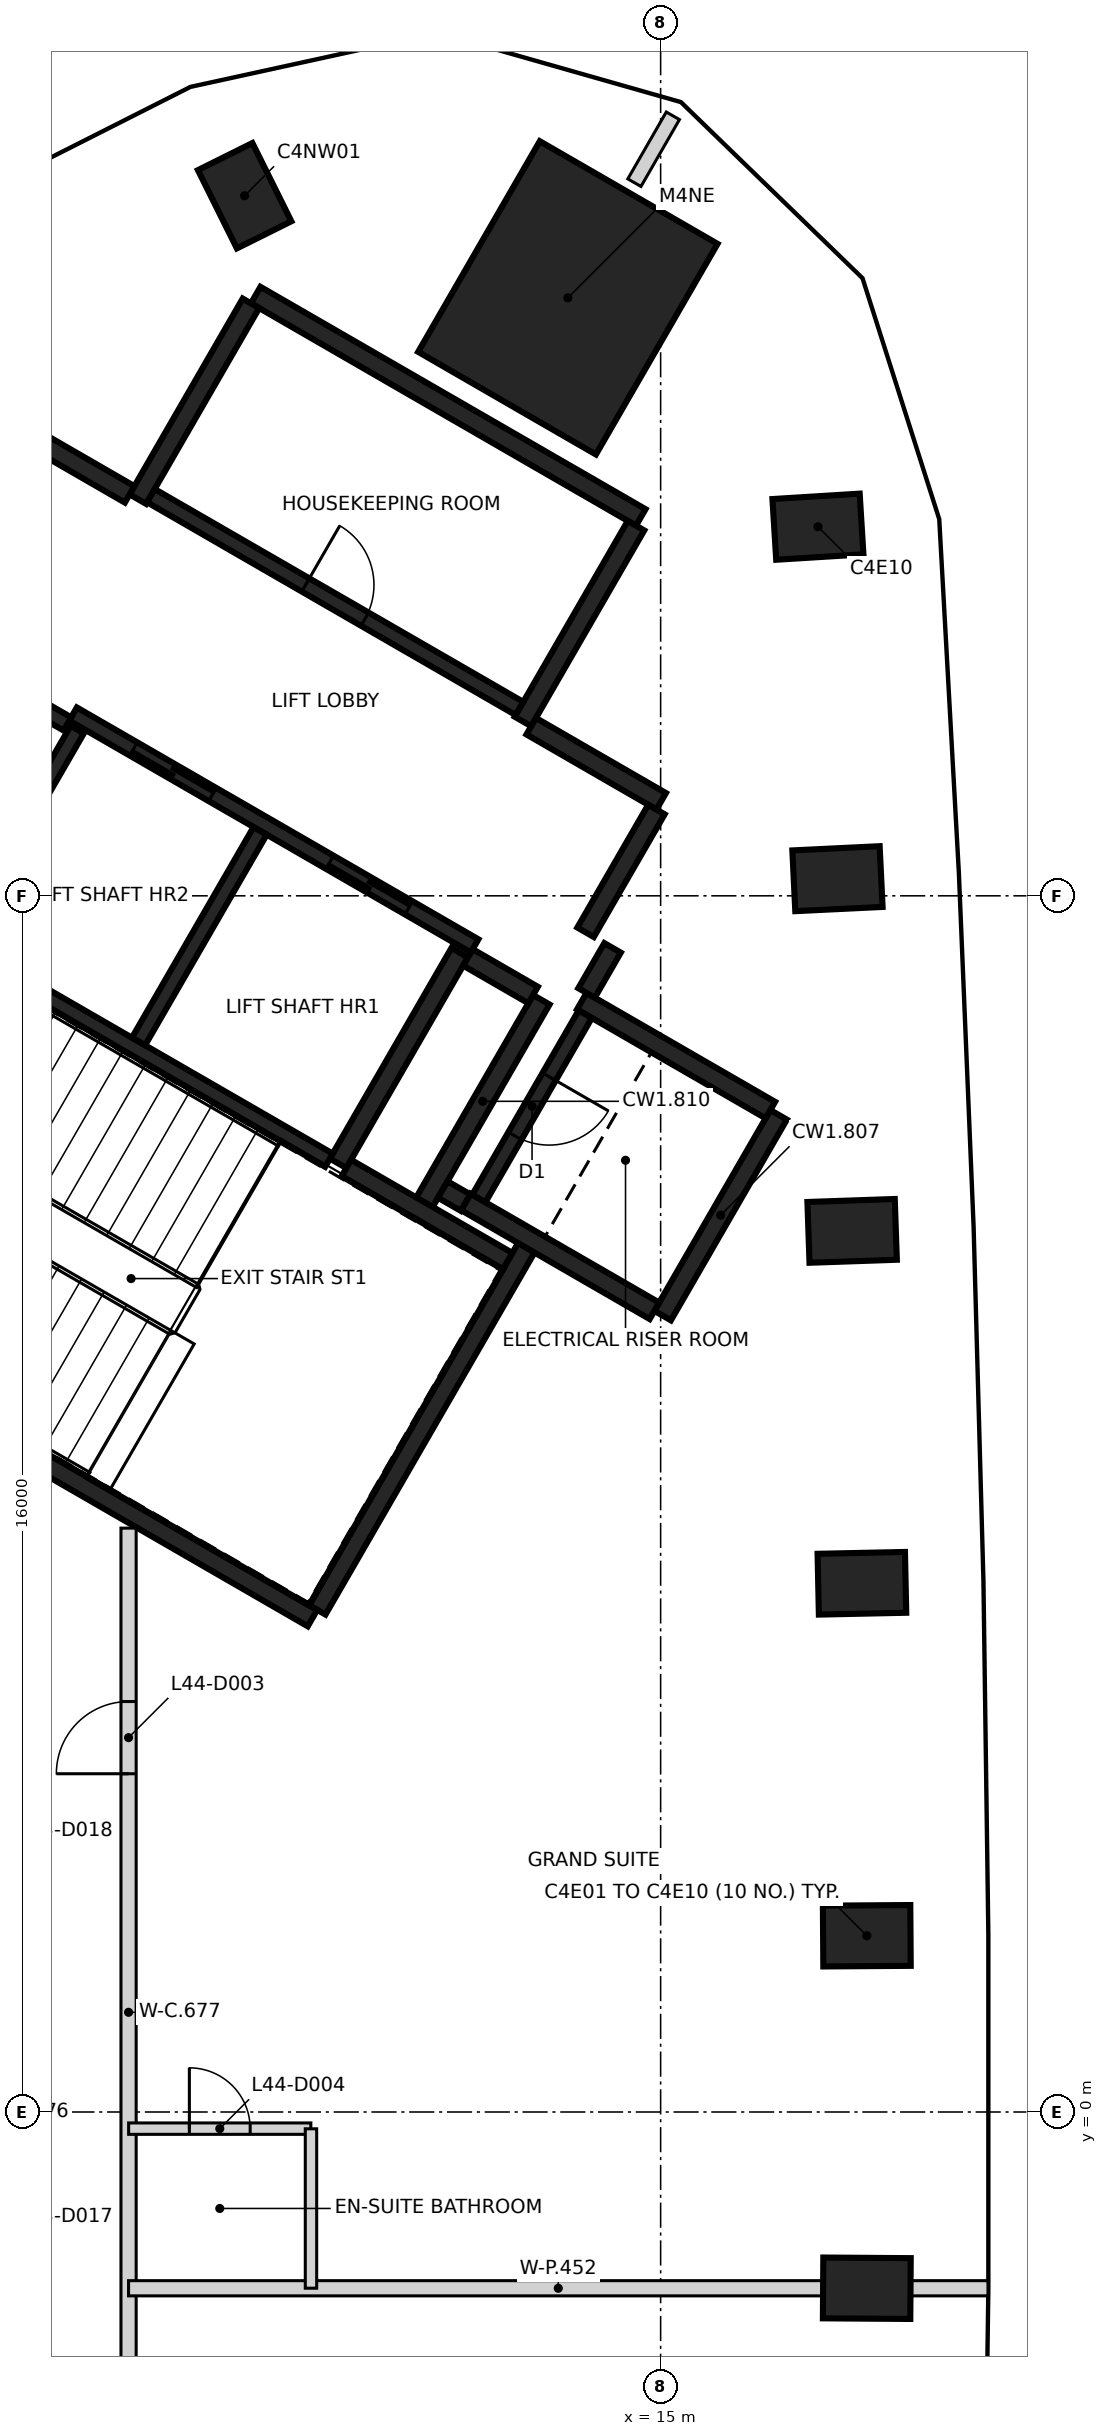
"""IFC4 building model, lengths in metres.
Left out: names, types, materials, properties, quantities, classifications, styles, units other than length and angle.
Written with IfcOpenShell. Run it as: python <this file> out.ifc"""

import sys

from ifc_helpers import new_model, si_unit, direction, frame, frame_2d, origin, origin_2d, place, context, subcontext, project, spatial, rectangle, extrude, element, fill, save


model = new_model("IFC4")
c1 = context("Model", 3, precision=1e-05, world=origin(), true_north=direction((0.0, 1.0)))
c2 = subcontext(c1, "Body", "Model", "MODEL_VIEW")
j1 = project(units=[si_unit("LENGTHUNIT", "METRE"), si_unit("PLANEANGLEUNIT", "RADIAN")], contexts=[c1])
p1 = place(None, origin())
s1 = spatial("IfcSite", under=j1, at=p1, CompositionType="ELEMENT")
p2 = place(p1, origin())
s2 = spatial("IfcBuilding", under=s1, at=p2, CompositionType="ELEMENT")
p3 = place(p2, frame((0.0, 0.0, 179.2)))
s3 = spatial("IfcBuildingStorey", under=s2, at=p3, CompositionType="ELEMENT", Elevation=179.2)
for number, where, z_axis, x_axis in (
    (1, (17.712, -2.319, -0.35), (0.0, 0.0, 1.0), (-1.0, 0.007, 0.0)),
    (2, (17.712, 2.319, -0.35), (0.0, 0.0, 1.0), (1.0, 0.007, 0.0)),
    (3, (17.648, 6.956, -0.35), (0.0, 0.0, 1.0), (1.0, 0.021, 0.0)),
    (4, (17.519, 11.592, -0.35), (0.0, 0.0, 1.0), (0.999, 0.034, 0.0)),
    (5, (17.326, 16.226, -0.35), (0.0, 0.0, 1.0), (0.999, 0.048, 0.0)),
    (6, (17.07, 20.856, -0.35), (0.0, 0.0, 1.0), (0.998, 0.062, 0.0)),
    (7, (9.527, 25.211, -0.35), (0.0, 0.0, 1.0), (-0.445, 0.895, 0.0)),
):
    element("IfcColumn", number, at=place(p3, frame(where, z_axis=z_axis, x_axis=x_axis)), inside=s3, PredefinedType="COLUMN", context=c2, shape_type="SweptSolid", body=[
        extrude(rectangle(XDim=1.15, YDim=0.8, at=origin_2d()), origin(), (0.0, 0.0, 1.0), 3.6),
    ])
p4 = place(p3, frame((13.78, 23.867, -0.35), z_axis=(0.0, 0.0, 1.0), x_axis=(0.5, 0.866025403784, 0.0)))
e8 = element("IfcColumn", 8, at=p4, inside=s3, PredefinedType="COLUMN", context=c2, shape_type="SweptSolid", body=[
    extrude(rectangle(XDim=3.2, YDim=2.7, at=origin_2d()), origin(), (0.0, 0.0, 1.0), 3.6),
])
p5 = place(p3, frame((10.42, 6.498, 0.0), z_axis=(0.0, 0.0, 1.0), x_axis=(-0.866021906294, 0.500006057782, 0.0)))
e9 = element("IfcWall", 9, at=p5, inside=s3, PredefinedType="SHEAR", context=c2, shape_type="SweptSolid", body=[
    extrude(rectangle(XDim=11.55, YDim=0.25, at=frame_2d((5.775, 0.0))), origin(), (0.0, 0.0, 1.0), 3.25),
])
p6 = place(p5, frame((10.025, 0.0, 0.0)))
e10 = element("IfcOpeningElement", 10, at=p6, cuts=e9, PredefinedType="OPENING", context=c2, shape_type="SweptSolid", body=[
    extrude(rectangle(XDim=1.2, YDim=2.1, at=frame_2d((0.6, 1.05))), frame((0.0, 0.135, 0.0), z_axis=(0.0, -1.0, 0.0), x_axis=(1.0, 0.0, 0.0)), (0.0, 0.0, 1.0), 0.27),
])
p7 = place(p5, frame((8.725, 0.0, 0.0)))
e11 = element("IfcOpeningElement", 11, at=p7, cuts=e9, PredefinedType="OPENING", context=c2, shape_type="SweptSolid", body=[
    extrude(rectangle(XDim=1.2, YDim=2.1, at=frame_2d((0.6, 1.05))), frame((0.0, 0.135, 0.0), z_axis=(0.0, -1.0, 0.0), x_axis=(1.0, 0.0, 0.0)), (0.0, 0.0, 1.0), 0.27),
])
p8 = place(p3, frame((9.673, 23.903, 0.0), z_axis=(0.0, 0.0, 1.0), x_axis=(0.86603616409, -0.499981362141, 0.0)))
e12 = element("IfcWall", 12, at=p8, inside=s3, PredefinedType="SHEAR", context=c2, shape_type="SweptSolid", body=[
    extrude(rectangle(XDim=5.85, YDim=0.25, at=frame_2d((2.925, 0.0))), origin(), (0.0, 0.0, 1.0), 3.25),
])
p9 = place(p3, frame((13.238, 11.378, 0.0), z_axis=(0.0, 0.0, 1.0), x_axis=(-0.500008851346, -0.866020293397, 0.0)))
e13 = element("IfcWall", 13, at=p9, inside=s3, PredefinedType="SHEAR", context=c2, shape_type="SweptSolid", body=[
    extrude(rectangle(XDim=5.51, YDim=0.25, at=frame_2d((2.755, 0.0))), origin(), (0.0, 0.0, 1.0), 3.25),
])
p10 = place(p3, frame((12.357, 15.252, 0.0), z_axis=(0.0, 0.0, 1.0), x_axis=(-0.500028443584, -0.866008981251, 0.0)))
e14 = element("IfcWall", 14, at=p10, inside=s3, PredefinedType="SHEAR", context=c2, shape_type="SweptSolid", body=[
    extrude(rectangle(XDim=3.2, YDim=0.25, at=frame_2d((1.6, 0.0))), origin(), (0.0, 0.0, 1.0), 3.25),
])
for number, where, z_axis, x_axis in (
    (15, (8.123, 21.219, 0.0), (0.0, 0.0, 1.0), (0.5, 0.866, 0.0)),
    (16, (14.676, 20.87, 0.0), (0.0, 0.0, 1.0), (-0.5, -0.866, 0.0)),
):
    element("IfcWall", number, at=place(p3, frame(where, z_axis=z_axis, x_axis=x_axis)), inside=s3, PredefinedType="SHEAR", context=c2, shape_type="SweptSolid", body=[
        extrude(rectangle(XDim=2.975, YDim=0.25, at=frame_2d((1.487, 0.0))), origin(), (0.0, 0.0, 1.0), 3.25),
    ])
p11 = place(p3, frame((16.552, 13.119, 0.0), z_axis=(0.0, 0.0, 1.0), x_axis=(-0.499978833458, -0.866037623948, 0.0)))
e17 = element("IfcWall", 17, at=p11, inside=s3, PredefinedType="SHEAR", context=c2, shape_type="SweptSolid", body=[
    extrude(rectangle(XDim=3.05, YDim=0.25, at=frame_2d((1.525, 0.0))), origin(), (0.0, 0.0, 1.0), 3.25),
])
p12 = place(p3, frame((14.918, 10.54, 0.0), z_axis=(0.0, 0.0, 1.0), x_axis=(-0.866063538972, 0.499933942099, 0.0)))
e18 = element("IfcWall", 18, at=p12, inside=s3, PredefinedType="SHEAR", context=c2, shape_type="SweptSolid", body=[
    extrude(rectangle(XDim=2.865, YDim=0.25, at=frame_2d((1.432, 0.0))), origin(), (0.0, 0.0, 1.0), 3.25),
])
p13 = place(p3, frame((13.963, 14.614, 0.0), z_axis=(0.0, 0.0, 1.0), x_axis=(0.866042235819, -0.499970844928, 0.0)))
e19 = element("IfcWall", 19, at=p13, inside=s3, PredefinedType="SHEAR", context=c2, shape_type="SweptSolid", body=[
    extrude(rectangle(XDim=2.865, YDim=0.25, at=frame_2d((1.432, 0.0))), origin(), (0.0, 0.0, 1.0), 3.25),
])
p14 = place(p3, frame((11.888, 11.961, 0.0), z_axis=(0.0, 0.0, 1.0), x_axis=(0.500003324108, 0.866023484601, 0.0)))
e20 = element("IfcWall", 20, at=p14, inside=s3, PredefinedType="SHEAR", context=c2, shape_type="SweptSolid", body=[
    extrude(rectangle(XDim=3.085, YDim=0.25, at=frame_2d((1.542, 0.0))), origin(), (0.0, 0.0, 1.0), 3.25),
])
p15 = place(p3, frame((10.865, 12.418, 0.0), z_axis=(0.0, 0.0, 1.0), x_axis=(0.866026229868, -0.499998569178, 0.0)))
e21 = element("IfcWall", 21, at=p15, inside=s3, PredefinedType="SHEAR", context=c2, shape_type="SweptSolid", body=[
    extrude(rectangle(XDim=2.449, YDim=0.25, at=frame_2d((1.225, 0.0))), origin(), (0.0, 0.0, 1.0), 3.25),
])
p16 = place(p3, frame((13.297, 18.231, 0.0), z_axis=(0.0, 0.0, 1.0), x_axis=(0.866043531843, -0.499968599967, 0.0)))
e22 = element("IfcWall", 22, at=p16, inside=s3, PredefinedType="SHEAR", context=c2, shape_type="SweptSolid", body=[
    extrude(rectangle(XDim=1.975, YDim=0.25, at=frame_2d((0.987, 0.0))), origin(), (0.0, 0.0, 1.0), 3.25),
])
p17 = place(p3, frame((6.413, 22.206, 0.0), z_axis=(0.0, 0.0, 1.0), x_axis=(0.866016279763, -0.500015802937, 0.0)))
e23 = element("IfcWall", 23, at=p17, inside=s3, PredefinedType="SHEAR", context=c2, shape_type="SweptSolid", body=[
    extrude(rectangle(XDim=1.849, YDim=0.25, at=frame_2d((0.925, 0.0))), origin(), (0.0, 0.0, 1.0), 3.25),
])
p18 = place(p3, frame((14.945, 17.135, 0.0), z_axis=(0.0, 0.0, 1.0), x_axis=(-0.499983108224, -0.866035156036, 0.0)))
e24 = element("IfcWall", 24, at=p18, inside=s3, PredefinedType="SHEAR", context=c2, shape_type="SweptSolid", body=[
    extrude(rectangle(XDim=1.865, YDim=0.25, at=frame_2d((0.932, 0.0))), origin(), (0.0, 0.0, 1.0), 3.25),
])
p19 = place(p3, frame((13.322, 14.695, 0.0), z_axis=(0.0, 0.0, 1.0), x_axis=(-0.866017078145, 0.500014420154, 0.0)))
e25 = element("IfcWall", 25, at=p19, inside=s3, PredefinedType="SHEAR", context=c2, shape_type="SweptSolid", body=[
    extrude(rectangle(XDim=0.989, YDim=0.25, at=frame_2d((0.495, 0.0))), origin(), (0.0, 0.0, 1.0), 3.25),
])
p20 = place(p3, frame((14.368, 15.315, 0.0), z_axis=(0.0, 0.0, 1.0), x_axis=(-0.499897359611, -0.866084655132, 0.0)))
e26 = element("IfcWall", 26, at=p20, inside=s3, PredefinedType="SHEAR", context=c2, shape_type="SweptSolid", body=[
    extrude(rectangle(XDim=0.685, YDim=0.25, at=frame_2d((0.342, 0.0))), origin(), (0.0, 0.0, 1.0), 3.25),
])
p21 = place(p3, frame((12.433, 11.964, 0.0), z_axis=(0.0, 0.0, 1.0), x_axis=(-0.866055875208, 0.499947218231, 0.0)))
e27 = element("IfcWall", 27, at=p21, inside=s3, PredefinedType="SHEAR", context=c2, shape_type="SweptSolid", body=[
    extrude(rectangle(XDim=0.345, YDim=0.25, at=frame_2d((0.172, 0.0))), origin(), (0.0, 0.0, 1.0), 3.25),
])
p22 = place(p3, frame((12.552, 15.342, 0.0), z_axis=(0.0, 0.0, 1.0), x_axis=(-0.866030299012, 0.499991521122, 0.0)))
e28 = element("IfcWall", 28, at=p22, inside=s3, PredefinedType="SHEAR", context=c2, shape_type="SweptSolid", body=[
    extrude(rectangle(XDim=6.1, YDim=0.2, at=frame_2d((3.05, 0.0))), origin(), (0.0, 0.0, 1.0), 3.25),
])
p23 = place(p22, frame((1.0, 0.0, 0.0)))
e29 = element("IfcOpeningElement", 29, at=p23, cuts=e28, PredefinedType="OPENING", context=c2, shape_type="SweptSolid", body=[
    extrude(rectangle(XDim=1.2, YDim=2.1, at=frame_2d((0.6, 1.05))), frame((0.0, 0.11, 0.0), z_axis=(0.0, -1.0, 0.0), x_axis=(1.0, 0.0, 0.0)), (0.0, 0.0, 1.0), 0.22),
])
p24 = place(p22, frame((3.982, 0.0, 0.0)))
e30 = element("IfcOpeningElement", 30, at=p24, cuts=e28, PredefinedType="OPENING", context=c2, shape_type="SweptSolid", body=[
    extrude(rectangle(XDim=1.2, YDim=2.1, at=frame_2d((0.6, 1.05))), frame((0.0, 0.11, 0.0), z_axis=(0.0, -1.0, 0.0), x_axis=(1.0, 0.0, 0.0)), (0.0, 0.0, 1.0), 0.22),
])
p25 = place(p3, frame((10.636, 12.521, 0.0), z_axis=(0.0, 0.0, 1.0), x_axis=(-0.866013252188, 0.500021046592, 0.0)))
e31 = element("IfcWall", 31, at=p25, inside=s3, PredefinedType="SHEAR", context=c2, shape_type="SweptSolid", body=[
    extrude(rectangle(XDim=5.851, YDim=0.2, at=frame_2d((2.925, 0.0))), origin(), (0.0, 0.0, 1.0), 3.25),
])
p26 = place(p3, frame((8.294, 21.264, 0.0), z_axis=(0.0, 0.0, 1.0), x_axis=(0.866025812541, -0.499999292012, 0.0)))
e32 = element("IfcWall", 32, at=p26, inside=s3, PredefinedType="SHEAR", context=c2, shape_type="SweptSolid", body=[
    extrude(rectangle(XDim=5.598, YDim=0.2, at=frame_2d((2.799, 0.0))), origin(), (0.0, 0.0, 1.0), 3.25),
])
p27 = place(p26, frame((2.349, 0.0, 0.0)))
e33 = element("IfcOpeningElement", 33, at=p27, cuts=e32, PredefinedType="OPENING", context=c2, shape_type="SweptSolid", body=[
    extrude(rectangle(XDim=0.9, YDim=2.1, at=frame_2d((0.45, 1.05))), frame((0.0, 0.11, 0.0), z_axis=(0.0, -1.0, 0.0), x_axis=(1.0, 0.0, 0.0)), (0.0, 0.0, 1.0), 0.22),
])
p28 = place(p3, frame((8.132, 14.084, 0.0), z_axis=(0.0, 0.0, 1.0), x_axis=(0.500030834389, 0.86600760081, 0.0)))
e34 = element("IfcWall", 34, at=p28, inside=s3, PredefinedType="SHEAR", context=c2, shape_type="SweptSolid", body=[
    extrude(rectangle(XDim=3.198, YDim=0.2, at=frame_2d((1.599, 0.0))), origin(), (0.0, 0.0, 1.0), 3.25),
])
p29 = place(p3, frame((14.008, 14.442, 0.0), z_axis=(0.0, 0.0, 1.0), x_axis=(-0.499986818241, -0.866033014143, 0.0)))
e35 = element("IfcWall", 35, at=p29, inside=s3, PredefinedType="SHEAR", context=c2, shape_type="SweptSolid", body=[
    extrude(rectangle(XDim=2.798, YDim=0.2, at=frame_2d((1.399, 0.0))), origin(), (0.0, 0.0, 1.0), 3.25),
])
p30 = place(p29, frame((0.949, 0.0, 0.0)))
e36 = element("IfcOpeningElement", 36, at=p30, cuts=e35, PredefinedType="OPENING", context=c2, shape_type="SweptSolid", body=[
    extrude(rectangle(XDim=0.9, YDim=2.1, at=frame_2d((0.45, 1.05))), frame((0.0, 0.11, 0.0), z_axis=(0.0, -1.0, 0.0), x_axis=(1.0, 0.0, 0.0)), (0.0, 0.0, 1.0), 0.22),
])
p31 = place(p3, frame((7.324, 18.187, 0.0), z_axis=(0.0, 0.0, 1.0), x_axis=(-0.499967891604, -0.866043940782, 0.0)))
e37 = element("IfcWall", 37, at=p31, inside=s3, PredefinedType="SHEAR", context=c2, shape_type="SweptSolid", body=[
    extrude(rectangle(XDim=3.1, YDim=0.2, at=frame_2d((1.55, 0.0))), origin(), (0.0, 0.0, 1.0), 3.25),
])
p32 = place(p3, frame((7.196, 18.26, 0.0), z_axis=(0.0, 0.0, 1.0), x_axis=(-0.866018407898, 0.500012117035, 0.0)))
e38 = element("IfcWall", 38, at=p32, inside=s3, PredefinedType="SHEAR", context=c2, shape_type="SweptSolid", body=[
    extrude(rectangle(XDim=2.651, YDim=0.2, at=frame_2d((1.325, 0.0))), origin(), (0.0, 0.0, 1.0), 3.25),
])
p33 = place(p3, frame((8.0, -5.058, 0.0), z_axis=(0.0, 0.0, 1.0), x_axis=(0.0, 1.0, 0.0)))
e39 = element("IfcWall", 39, at=p33, inside=s3, PredefinedType="PARTITIONING", context=c2, shape_type="SweptSolid", body=[
    extrude(rectangle(XDim=12.74, YDim=0.2, at=frame_2d((6.37, 0.0))), origin(), (0.0, 0.0, 1.0), 3.25),
])
p34 = place(p33, frame((9.508, 0.0, 0.0)))
e40 = element("IfcOpeningElement", 40, at=p34, cuts=e39, PredefinedType="OPENING", context=c2, shape_type="SweptSolid", body=[
    extrude(rectangle(XDim=0.95, YDim=2.1, at=frame_2d((0.475, 1.05))), frame((0.0, 0.11, 0.0), z_axis=(0.0, -1.0, 0.0), x_axis=(1.0, 0.0, 0.0)), (0.0, 0.0, 1.0), 0.22),
])
p35 = place(p3, frame((8.0, -2.319, 0.0), z_axis=(0.0, 0.0, 1.0), x_axis=(1.0, 0.0, 0.0)))
e41 = element("IfcWall", 41, at=p35, inside=s3, PredefinedType="PARTITIONING", context=c2, shape_type="SweptSolid", body=[
    extrude(rectangle(XDim=11.306, YDim=0.2, at=frame_2d((5.653, 0.0))), origin(), (0.0, 0.0, 1.0), 3.25),
])
p36 = place(p3, frame((14.655, 25.382, 0.0), z_axis=(0.0, 0.0, 1.0), x_axis=(0.498416889665, 0.866937485691, 0.0)))
e42 = element("IfcWall", 42, at=p36, inside=s3, PredefinedType="PARTITIONING", context=c2, shape_type="SweptSolid", body=[
    extrude(rectangle(XDim=1.015, YDim=0.2, at=frame_2d((0.507, 0.0))), origin(), (0.0, 0.0, 1.0), 3.25),
])
p37 = place(p3, frame((8.001, -0.219, 0.0), z_axis=(0.0, 0.0, 1.0), x_axis=(1.0, 0.0, 0.0)))
e43 = element("IfcWall", 43, at=p37, inside=s3, PredefinedType="PARTITIONING", context=c2, shape_type="SweptSolid", body=[
    extrude(rectangle(XDim=2.397, YDim=0.15, at=frame_2d((1.198, 0.0))), origin(), (0.0, 0.0, 1.0), 3.25),
])
p38 = place(p37, frame((0.799, 0.0, 0.0)))
e44 = element("IfcOpeningElement", 44, at=p38, cuts=e43, PredefinedType="OPENING", context=c2, shape_type="SweptSolid", body=[
    extrude(rectangle(XDim=0.8, YDim=2.1, at=frame_2d((0.4, 1.05))), frame((0.0, 0.085, 0.0), z_axis=(0.0, -1.0, 0.0), x_axis=(1.0, 0.0, 0.0)), (0.0, 0.0, 1.0), 0.17),
])
p39 = place(p3, frame((10.4, -2.318, 0.0), z_axis=(0.0, 0.0, 1.0), x_axis=(0.0, 1.0, 0.0)))
e45 = element("IfcWall", 45, at=p39, inside=s3, PredefinedType="PARTITIONING", context=c2, shape_type="SweptSolid", body=[
    extrude(rectangle(XDim=2.097, YDim=0.15, at=frame_2d((1.049, 0.0))), origin(), (0.0, 0.0, 1.0), 3.25),
])
p40 = place(p23, origin())
e46 = element("IfcDoor", 46, at=p40, inside=s3, OperationType="DOUBLE_DOOR_SLIDING", PredefinedType="DOOR", context=c2, shape_type="SweptSolid", body=[
    extrude(rectangle(XDim=1.2, YDim=2.1, at=frame_2d((0.6, 1.05))), frame((0.0, 0.025, 0.0), z_axis=(0.0, -1.0, 0.0), x_axis=(1.0, 0.0, 0.0)), (0.0, 0.0, 1.0), 0.05),
])
fill(e29, e46)
p41 = place(p24, origin())
e47 = element("IfcDoor", 47, at=p41, inside=s3, OperationType="DOUBLE_DOOR_SLIDING", PredefinedType="DOOR", context=c2, shape_type="SweptSolid", body=[
    extrude(rectangle(XDim=1.2, YDim=2.1, at=frame_2d((0.6, 1.05))), frame((0.0, 0.025, 0.0), z_axis=(0.0, -1.0, 0.0), x_axis=(1.0, 0.0, 0.0)), (0.0, 0.0, 1.0), 0.05),
])
fill(e30, e47)
p42 = place(p27, origin())
e48 = element("IfcDoor", 48, at=p42, inside=s3, OperationType="SINGLE_SWING_RIGHT", PredefinedType="DOOR", context=c2, shape_type="SweptSolid", body=[
    extrude(rectangle(XDim=0.9, YDim=2.1, at=frame_2d((0.45, 1.05))), frame((0.0, 0.025, 0.0), z_axis=(0.0, -1.0, 0.0), x_axis=(1.0, 0.0, 0.0)), (0.0, 0.0, 1.0), 0.05),
])
fill(e33, e48)
p43 = place(p30, origin())
e49 = element("IfcDoor", 49, at=p43, inside=s3, OperationType="SINGLE_SWING_LEFT", PredefinedType="DOOR", context=c2, shape_type="SweptSolid", body=[
    extrude(rectangle(XDim=0.9, YDim=2.1, at=frame_2d((0.45, 1.05))), frame((0.0, 0.025, 0.0), z_axis=(0.0, -1.0, 0.0), x_axis=(1.0, 0.0, 0.0)), (0.0, 0.0, 1.0), 0.05),
])
fill(e36, e49)
p44 = place(p34, frame((0.95, 0.0, 0.0), z_axis=(0.0, 0.0, 1.0), x_axis=(-1.0, 0.0, 0.0)))
e50 = element("IfcDoor", 50, at=p44, inside=s3, OperationType="SINGLE_SWING_LEFT", PredefinedType="DOOR", context=c2, shape_type="SweptSolid", body=[
    extrude(rectangle(XDim=0.95, YDim=2.1, at=frame_2d((0.475, 1.05))), frame((0.0, 0.025, 0.0), z_axis=(0.0, -1.0, 0.0), x_axis=(1.0, 0.0, 0.0)), (0.0, 0.0, 1.0), 0.05),
])
fill(e40, e50)
p45 = place(p38, origin())
e51 = element("IfcDoor", 51, at=p45, inside=s3, OperationType="SINGLE_SWING_LEFT", PredefinedType="DOOR", context=c2, shape_type="SweptSolid", body=[
    extrude(rectangle(XDim=0.8, YDim=2.1, at=frame_2d((0.4, 1.05))), frame((0.0, 0.025, 0.0), z_axis=(0.0, -1.0, 0.0), x_axis=(1.0, 0.0, 0.0)), (0.0, 0.0, 1.0), 0.05),
])
fill(e44, e51)
save(model, sys.argv[1])
